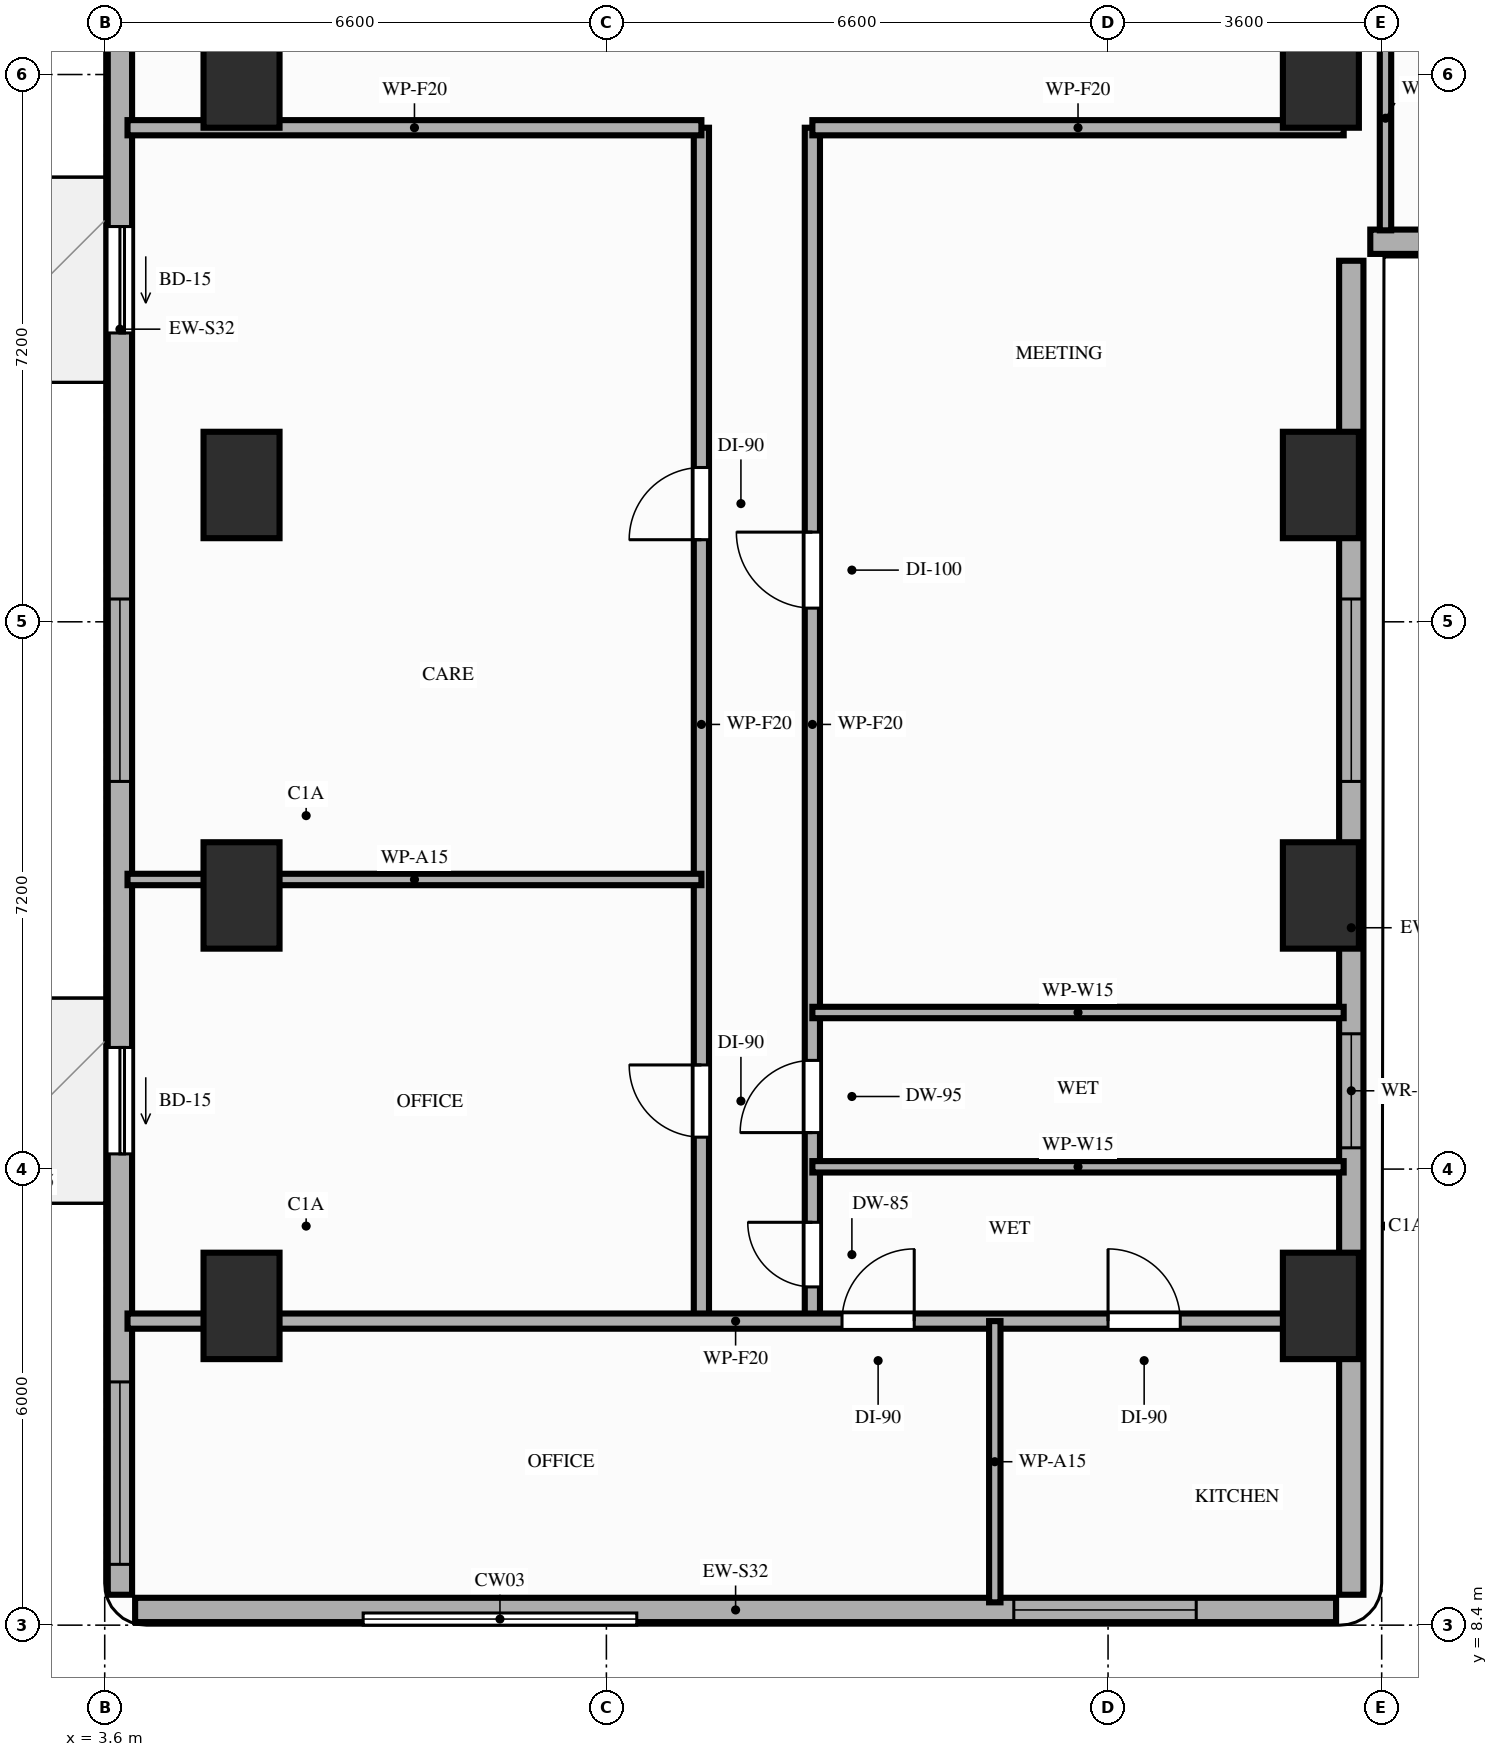
"""IFC4 building model, lengths in metres.
Left out: names, types, materials, properties, quantities, classifications, styles, units other than length and angle.
Written with IfcOpenShell. Run it as: python <this file> out.ifc"""

import sys

from ifc_helpers import new_model, si_unit, direction, frame, frame_2d, origin, origin_2d, place, context, subcontext, project, spatial, rectangle, extrude, element, fill, save


model = new_model("IFC4")
c1 = context("Model", 3, precision=1e-05, world=origin(), true_north=direction((0.0, 1.0)))
c2 = subcontext(c1, "Body", "Model", "MODEL_VIEW")
j1 = project(units=[si_unit("LENGTHUNIT", "METRE"), si_unit("PLANEANGLEUNIT", "RADIAN")], contexts=[c1])
p1 = place(None, origin())
s1 = spatial("IfcSite", under=j1, at=p1, CompositionType="ELEMENT")
p2 = place(p1, origin())
s2 = spatial("IfcBuilding", under=s1, at=p2, CompositionType="ELEMENT")
p3 = place(p2, frame((0.0, 0.0, 66.0)))
s3 = spatial("IfcBuildingStorey", under=s2, at=p3, CompositionType="ELEMENT", Elevation=66.0)
for number, where, z_axis, x_axis in (
    (1, (5.4, 12.6, 0.0), (0.0, 0.0, 1.0), (1.0, 0.0, 0.0)),
    (2, (19.6, 12.6, 0.0), (0.0, 0.0, 1.0), (1.0, 0.0, 0.0)),
    (3, (5.4, 18.0, 0.0), (0.0, 0.0, 1.0), (1.0, 0.0, 0.0)),
    (4, (19.6, 18.0, 0.0), (0.0, 0.0, 1.0), (1.0, 0.0, 0.0)),
    (5, (5.4, 23.4, 0.0), (0.0, 0.0, 1.0), (1.0, 0.0, 0.0)),
    (6, (19.6, 23.4, 0.0), (0.0, 0.0, 1.0), (1.0, 0.0, 0.0)),
    (7, (5.4, 28.8, 0.0), (0.0, 0.0, 1.0), (1.0, 0.0, 0.0)),
    (8, (19.6, 28.8, 0.0), (0.0, 0.0, 1.0), (1.0, 0.0, 0.0)),
):
    element("IfcColumn", number, at=place(p3, frame(where, z_axis=z_axis, x_axis=x_axis)), inside=s3, PredefinedType="COLUMN", context=c2, shape_type="SweptSolid", body=[
        extrude(rectangle(XDim=1.0, YDim=1.4, at=origin_2d()), origin(), (0.0, 0.0, 1.0), 3.2),
    ])
p4 = place(p3, frame((4.0, 8.6, 0.0), z_axis=(0.0, 0.0, 1.0), x_axis=(1.0, 0.0, 0.0)))
e9 = element("IfcWall", 9, at=p4, inside=s3, PredefinedType="STANDARD", context=c2, shape_type="SweptSolid", body=[
    extrude(rectangle(XDim=15.8, YDim=0.32, at=frame_2d((7.9, 0.0))), origin(), (0.0, 0.0, 1.0), 3.02),
])
p5 = place(p4, frame((11.56, 0.0, 0.85)))
e10 = element("IfcOpeningElement", 10, at=p5, cuts=e9, PredefinedType="OPENING", context=c2, shape_type="SweptSolid", body=[
    extrude(rectangle(XDim=2.4, YDim=1.8, at=frame_2d((1.2, 0.9))), frame((0.0, 0.17, 0.0), z_axis=(0.0, -1.0, 0.0), x_axis=(1.0, 0.0, 0.0)), (0.0, 0.0, 1.0), 0.34),
])
p6 = place(p3, frame((3.8, 42.1, 0.0), z_axis=(0.0, 0.0, 1.0), x_axis=(0.0, -1.0, 0.0)))
e11 = element("IfcWall", 11, at=p6, inside=s3, PredefinedType="STANDARD", context=c2, shape_type="SweptSolid", body=[
    extrude(rectangle(XDim=33.3, YDim=0.32, at=frame_2d((16.65, 0.0))), origin(), (0.0, 0.0, 1.0), 2.7),
])
p7 = place(p6, frame((26.1, 0.0, 0.0)))
e12 = element("IfcOpeningElement", 12, at=p7, cuts=e11, PredefinedType="OPENING", context=c2, shape_type="SweptSolid", body=[
    extrude(rectangle(XDim=1.4, YDim=2.1, at=frame_2d((0.7, 1.05))), frame((0.0, 0.17, 0.0), z_axis=(0.0, -1.0, 0.0), x_axis=(1.0, 0.0, 0.0)), (0.0, 0.0, 1.0), 0.34),
])
p8 = place(p6, frame((15.3, 0.0, 0.0)))
e13 = element("IfcOpeningElement", 13, at=p8, cuts=e11, PredefinedType="OPENING", context=c2, shape_type="SweptSolid", body=[
    extrude(rectangle(XDim=1.4, YDim=2.1, at=frame_2d((0.7, 1.05))), frame((0.0, 0.17, 0.0), z_axis=(0.0, -1.0, 0.0), x_axis=(1.0, 0.0, 0.0)), (0.0, 0.0, 1.0), 0.34),
])
p9 = place(p6, frame((30.5, 0.0, 0.85)))
e14 = element("IfcOpeningElement", 14, at=p9, cuts=e11, PredefinedType="OPENING", context=c2, shape_type="SweptSolid", body=[
    extrude(rectangle(XDim=2.4, YDim=1.6, at=frame_2d((1.2, 0.8))), frame((0.0, 0.17, 0.0), z_axis=(0.0, -1.0, 0.0), x_axis=(1.0, 0.0, 0.0)), (0.0, 0.0, 1.0), 0.34),
])
p10 = place(p6, frame((20.2, 0.0, 0.85)))
e15 = element("IfcOpeningElement", 15, at=p10, cuts=e11, PredefinedType="OPENING", context=c2, shape_type="SweptSolid", body=[
    extrude(rectangle(XDim=2.4, YDim=1.6, at=frame_2d((1.2, 0.8))), frame((0.0, 0.17, 0.0), z_axis=(0.0, -1.0, 0.0), x_axis=(1.0, 0.0, 0.0)), (0.0, 0.0, 1.0), 0.34),
])
p11 = place(p6, frame((9.6, 0.0, 0.85)))
e16 = element("IfcOpeningElement", 16, at=p11, cuts=e11, PredefinedType="OPENING", context=c2, shape_type="SweptSolid", body=[
    extrude(rectangle(XDim=2.4, YDim=1.6, at=frame_2d((1.2, 0.8))), frame((0.0, 0.17, 0.0), z_axis=(0.0, -1.0, 0.0), x_axis=(1.0, 0.0, 0.0)), (0.0, 0.0, 1.0), 0.34),
])
p12 = place(p6, frame((3.5, 0.0, 0.85)))
e17 = element("IfcOpeningElement", 17, at=p12, cuts=e11, PredefinedType="OPENING", context=c2, shape_type="SweptSolid", body=[
    extrude(rectangle(XDim=2.4, YDim=1.6, at=frame_2d((1.2, 0.8))), frame((0.0, 0.17, 0.0), z_axis=(0.0, -1.0, 0.0), x_axis=(1.0, 0.0, 0.0)), (0.0, 0.0, 1.0), 0.34),
])
p13 = place(p3, frame((20.0, 8.8, 0.0), z_axis=(0.0, 0.0, 1.0), x_axis=(0.0, 1.0, 0.0)))
e18 = element("IfcWall", 18, at=p13, inside=s3, PredefinedType="STANDARD", context=c2, shape_type="SweptSolid", body=[
    extrude(rectangle(XDim=17.55, YDim=0.32, at=frame_2d((8.775, 0.0))), origin(), (0.0, 0.0, 1.0), 2.41),
])
p14 = place(p13, frame((5.88, 0.0, 0.85)))
e19 = element("IfcOpeningElement", 19, at=p14, cuts=e18, PredefinedType="OPENING", context=c2, shape_type="SweptSolid", body=[
    extrude(rectangle(XDim=1.5, YDim=1.31, at=frame_2d((0.75, 0.655))), frame((0.0, 0.17, 0.0), z_axis=(0.0, -1.0, 0.0), x_axis=(1.0, 0.0, 0.0)), (0.0, 0.0, 1.0), 0.34),
])
p15 = place(p13, frame((10.7, 0.0, 0.85)))
e20 = element("IfcOpeningElement", 20, at=p15, cuts=e18, PredefinedType="OPENING", context=c2, shape_type="SweptSolid", body=[
    extrude(rectangle(XDim=2.4, YDim=1.31, at=frame_2d((1.2, 0.655))), frame((0.0, 0.17, 0.0), z_axis=(0.0, -1.0, 0.0), x_axis=(1.0, 0.0, 0.0)), (0.0, 0.0, 1.0), 0.34),
])
p16 = place(p3, frame((20.25, 26.6, 0.0), z_axis=(0.0, 0.0, 1.0), x_axis=(1.0, 0.0, 0.0)))
e21 = element("IfcWall", 21, at=p16, inside=s3, PredefinedType="STANDARD", context=c2, shape_type="SweptSolid", body=[
    extrude(rectangle(XDim=26.15, YDim=0.32, at=frame_2d((13.075, 0.0))), origin(), (0.0, 0.0, 1.0), 2.7),
])
p17 = place(p16, frame((1.95, 0.0, 0.85)))
e22 = element("IfcOpeningElement", 22, at=p17, cuts=e21, PredefinedType="OPENING", context=c2, shape_type="SweptSolid", body=[
    extrude(rectangle(XDim=2.4, YDim=1.6, at=frame_2d((1.2, 0.8))), frame((0.0, 0.17, 0.0), z_axis=(0.0, -1.0, 0.0), x_axis=(1.0, 0.0, 0.0)), (0.0, 0.0, 1.0), 0.34),
])
p18 = place(p16, frame((7.45, 0.0, 0.85)))
e23 = element("IfcOpeningElement", 23, at=p18, cuts=e21, PredefinedType="OPENING", context=c2, shape_type="SweptSolid", body=[
    extrude(rectangle(XDim=2.4, YDim=1.6, at=frame_2d((1.2, 0.8))), frame((0.0, 0.17, 0.0), z_axis=(0.0, -1.0, 0.0), x_axis=(1.0, 0.0, 0.0)), (0.0, 0.0, 1.0), 0.34),
])
p19 = place(p16, frame((21.95, 0.0, 0.85)))
e24 = element("IfcOpeningElement", 24, at=p19, cuts=e21, PredefinedType="OPENING", context=c2, shape_type="SweptSolid", body=[
    extrude(rectangle(XDim=2.4, YDim=1.6, at=frame_2d((1.2, 0.8))), frame((0.0, 0.17, 0.0), z_axis=(0.0, -1.0, 0.0), x_axis=(1.0, 0.0, 0.0)), (0.0, 0.0, 1.0), 0.34),
])
p20 = place(p3, frame((11.45, 12.4, 0.0), z_axis=(0.0, 0.0, 1.0), x_axis=(0.0, 1.0, 0.0)))
e25 = element("IfcWall", 25, at=p20, inside=s3, PredefinedType="PARTITIONING", context=c2, shape_type="SweptSolid", body=[
    extrude(rectangle(XDim=15.7, YDim=0.2, at=frame_2d((7.85, 0.0))), origin(), (0.0, 0.0, 1.0), 2.41),
])
p21 = place(p20, frame((2.42, 0.0, 0.0)))
e26 = element("IfcOpeningElement", 26, at=p21, cuts=e25, PredefinedType="OPENING", context=c2, shape_type="SweptSolid", body=[
    extrude(rectangle(XDim=0.95, YDim=2.15, at=frame_2d((0.475, 1.075))), frame((0.0, 0.11, 0.0), z_axis=(0.0, -1.0, 0.0), x_axis=(1.0, 0.0, 0.0)), (0.0, 0.0, 1.0), 0.22),
])
p22 = place(p20, frame((10.28, 0.0, 0.0)))
e27 = element("IfcOpeningElement", 27, at=p22, cuts=e25, PredefinedType="OPENING", context=c2, shape_type="SweptSolid", body=[
    extrude(rectangle(XDim=0.95, YDim=2.15, at=frame_2d((0.475, 1.075))), frame((0.0, 0.11, 0.0), z_axis=(0.0, -1.0, 0.0), x_axis=(1.0, 0.0, 0.0)), (0.0, 0.0, 1.0), 0.22),
])
p23 = place(p3, frame((12.91, 12.4, 0.0), z_axis=(0.0, 0.0, 1.0), x_axis=(0.0, 1.0, 0.0)))
e28 = element("IfcWall", 28, at=p23, inside=s3, PredefinedType="PARTITIONING", context=c2, shape_type="SweptSolid", body=[
    extrude(rectangle(XDim=15.7, YDim=0.2, at=frame_2d((7.85, 0.0))), origin(), (0.0, 0.0, 1.0), 2.41),
])
p24 = place(p23, frame((0.45, 0.0, 0.0)))
e29 = element("IfcOpeningElement", 29, at=p24, cuts=e28, PredefinedType="OPENING", context=c2, shape_type="SweptSolid", body=[
    extrude(rectangle(XDim=0.85, YDim=2.1, at=frame_2d((0.425, 1.05))), frame((0.0, 0.11, 0.0), z_axis=(0.0, -1.0, 0.0), x_axis=(1.0, 0.0, 0.0)), (0.0, 0.0, 1.0), 0.22),
])
p25 = place(p23, frame((2.48, 0.0, 0.0)))
e30 = element("IfcOpeningElement", 30, at=p25, cuts=e28, PredefinedType="OPENING", context=c2, shape_type="SweptSolid", body=[
    extrude(rectangle(XDim=0.95, YDim=2.1, at=frame_2d((0.475, 1.05))), frame((0.0, 0.11, 0.0), z_axis=(0.0, -1.0, 0.0), x_axis=(1.0, 0.0, 0.0)), (0.0, 0.0, 1.0), 0.22),
])
p26 = place(p23, frame((9.38, 0.0, 0.0)))
e31 = element("IfcOpeningElement", 31, at=p26, cuts=e28, PredefinedType="OPENING", context=c2, shape_type="SweptSolid", body=[
    extrude(rectangle(XDim=1.0, YDim=2.15, at=frame_2d((0.5, 1.075))), frame((0.0, 0.11, 0.0), z_axis=(0.0, -1.0, 0.0), x_axis=(1.0, 0.0, 0.0)), (0.0, 0.0, 1.0), 0.22),
])
p27 = place(p3, frame((3.9, 12.4, 0.0), z_axis=(0.0, 0.0, 1.0), x_axis=(1.0, 0.0, 0.0)))
e32 = element("IfcWall", 32, at=p27, inside=s3, PredefinedType="PARTITIONING", context=c2, shape_type="SweptSolid", body=[
    extrude(rectangle(XDim=16.0, YDim=0.2, at=frame_2d((8.0, 0.0))), origin(), (0.0, 0.0, 1.0), 2.41),
])
p28 = place(p27, frame((9.4, 0.0, 0.0)))
e33 = element("IfcOpeningElement", 33, at=p28, cuts=e32, PredefinedType="OPENING", context=c2, shape_type="SweptSolid", body=[
    extrude(rectangle(XDim=0.95, YDim=2.15, at=frame_2d((0.475, 1.075))), frame((0.0, 0.11, 0.0), z_axis=(0.0, -1.0, 0.0), x_axis=(1.0, 0.0, 0.0)), (0.0, 0.0, 1.0), 0.22),
])
p29 = place(p27, frame((12.9, 0.0, 0.0)))
e34 = element("IfcOpeningElement", 34, at=p29, cuts=e32, PredefinedType="OPENING", context=c2, shape_type="SweptSolid", body=[
    extrude(rectangle(XDim=0.95, YDim=2.15, at=frame_2d((0.475, 1.075))), frame((0.0, 0.11, 0.0), z_axis=(0.0, -1.0, 0.0), x_axis=(1.0, 0.0, 0.0)), (0.0, 0.0, 1.0), 0.22),
])
p30 = place(p3, frame((3.9, 28.1, 0.0), z_axis=(0.0, 0.0, 1.0), x_axis=(1.0, 0.0, 0.0)))
e35 = element("IfcWall", 35, at=p30, inside=s3, PredefinedType="PARTITIONING", context=c2, shape_type="SweptSolid", body=[
    extrude(rectangle(XDim=7.55, YDim=0.2, at=frame_2d((3.775, 0.0))), origin(), (0.0, 0.0, 1.0), 2.41),
])
p31 = place(p3, frame((12.91, 28.1, 0.0), z_axis=(0.0, 0.0, 1.0), x_axis=(1.0, 0.0, 0.0)))
e36 = element("IfcWall", 36, at=p31, inside=s3, PredefinedType="PARTITIONING", context=c2, shape_type="SweptSolid", body=[
    extrude(rectangle(XDim=6.99, YDim=0.2, at=frame_2d((3.495, 0.0))), origin(), (0.0, 0.0, 1.0), 2.41),
])
p32 = place(p3, frame((20.45, 26.75, 0.0), z_axis=(0.0, 0.0, 1.0), x_axis=(0.0, 1.0, 0.0)))
e37 = element("IfcWall", 37, at=p32, inside=s3, PredefinedType="PARTITIONING", context=c2, shape_type="SweptSolid", body=[
    extrude(rectangle(XDim=2.95, YDim=0.15, at=frame_2d((1.475, 0.0))), origin(), (0.0, 0.0, 1.0), 2.41),
])
p33 = place(p3, frame((3.9, 18.21, 0.0), z_axis=(0.0, 0.0, 1.0), x_axis=(1.0, 0.0, 0.0)))
e38 = element("IfcWall", 38, at=p33, inside=s3, PredefinedType="PARTITIONING", context=c2, shape_type="SweptSolid", body=[
    extrude(rectangle(XDim=7.55, YDim=0.15, at=frame_2d((3.775, 0.0))), origin(), (0.0, 0.0, 1.0), 2.41),
])
p34 = place(p3, frame((15.31, 8.7, 0.0), z_axis=(0.0, 0.0, 1.0), x_axis=(0.0, 1.0, 0.0)))
e39 = element("IfcWall", 39, at=p34, inside=s3, PredefinedType="PARTITIONING", context=c2, shape_type="SweptSolid", body=[
    extrude(rectangle(XDim=3.7, YDim=0.15, at=frame_2d((1.85, 0.0))), origin(), (0.0, 0.0, 1.0), 2.41),
])
for number, where, z_axis, x_axis in (
    (40, (12.91, 14.43, 0.0), (0.0, 0.0, 1.0), (1.0, 0.0, 0.0)),
    (41, (12.91, 16.46, 0.0), (0.0, 0.0, 1.0), (1.0, 0.0, 0.0)),
):
    element("IfcWall", number, at=place(p3, frame(where, z_axis=z_axis, x_axis=x_axis)), inside=s3, PredefinedType="PARTITIONING", context=c2, shape_type="SweptSolid", body=[
        extrude(rectangle(XDim=6.99, YDim=0.15, at=frame_2d((3.495, 0.0))), origin(), (0.0, 0.0, 1.0), 2.41),
    ])
p35 = place(p7, origin())
e42 = element("IfcDoor", 42, at=p35, inside=s3, OperationType="SLIDING_TO_RIGHT", PredefinedType="DOOR", context=c2, shape_type="SweptSolid", body=[
    extrude(rectangle(XDim=1.4, YDim=2.1, at=frame_2d((0.7, 1.05))), frame((0.0, 0.025, 0.0), z_axis=(0.0, -1.0, 0.0), x_axis=(1.0, 0.0, 0.0)), (0.0, 0.0, 1.0), 0.05),
])
fill(e12, e42)
p36 = place(p8, origin())
e43 = element("IfcDoor", 43, at=p36, inside=s3, OperationType="SLIDING_TO_RIGHT", PredefinedType="DOOR", context=c2, shape_type="SweptSolid", body=[
    extrude(rectangle(XDim=1.4, YDim=2.1, at=frame_2d((0.7, 1.05))), frame((0.0, 0.025, 0.0), z_axis=(0.0, -1.0, 0.0), x_axis=(1.0, 0.0, 0.0)), (0.0, 0.0, 1.0), 0.05),
])
fill(e13, e43)
p37 = place(p9, origin())
e44 = element("IfcWindow", 44, at=p37, inside=s3, PartitioningType="SINGLE_PANEL", PredefinedType="WINDOW", context=c2, shape_type="SweptSolid", body=[
    extrude(rectangle(XDim=2.4, YDim=1.6, at=frame_2d((1.2, 0.8))), frame((0.0, 0.03, 0.0), z_axis=(0.0, -1.0, 0.0), x_axis=(1.0, 0.0, 0.0)), (0.0, 0.0, 1.0), 0.06),
])
fill(e14, e44)
p38 = place(p10, origin())
e45 = element("IfcWindow", 45, at=p38, inside=s3, PartitioningType="SINGLE_PANEL", PredefinedType="WINDOW", context=c2, shape_type="SweptSolid", body=[
    extrude(rectangle(XDim=2.4, YDim=1.6, at=frame_2d((1.2, 0.8))), frame((0.0, 0.03, 0.0), z_axis=(0.0, -1.0, 0.0), x_axis=(1.0, 0.0, 0.0)), (0.0, 0.0, 1.0), 0.06),
])
fill(e15, e45)
p39 = place(p14, origin())
e46 = element("IfcWindow", 46, at=p39, inside=s3, PartitioningType="SINGLE_PANEL", PredefinedType="WINDOW", context=c2, shape_type="SweptSolid", body=[
    extrude(rectangle(XDim=1.5, YDim=1.31, at=frame_2d((0.75, 0.655))), frame((0.0, 0.03, 0.0), z_axis=(0.0, -1.0, 0.0), x_axis=(1.0, 0.0, 0.0)), (0.0, 0.0, 1.0), 0.06),
])
fill(e19, e46)
p40 = place(p15, origin())
e47 = element("IfcWindow", 47, at=p40, inside=s3, PartitioningType="SINGLE_PANEL", PredefinedType="WINDOW", context=c2, shape_type="SweptSolid", body=[
    extrude(rectangle(XDim=2.4, YDim=1.31, at=frame_2d((1.2, 0.655))), frame((0.0, 0.03, 0.0), z_axis=(0.0, -1.0, 0.0), x_axis=(1.0, 0.0, 0.0)), (0.0, 0.0, 1.0), 0.06),
])
fill(e20, e47)
p41 = place(p5, origin())
e48 = element("IfcWindow", 48, at=p41, inside=s3, PartitioningType="SINGLE_PANEL", PredefinedType="WINDOW", context=c2, shape_type="SweptSolid", body=[
    extrude(rectangle(XDim=2.4, YDim=1.8, at=frame_2d((1.2, 0.9))), frame((0.0, 0.03, 0.0), z_axis=(0.0, -1.0, 0.0), x_axis=(1.0, 0.0, 0.0)), (0.0, 0.0, 1.0), 0.06),
])
fill(e10, e48)
p42 = place(p21, origin())
e49 = element("IfcDoor", 49, at=p42, inside=s3, OperationType="SINGLE_SWING_RIGHT", PredefinedType="DOOR", context=c2, shape_type="SweptSolid", body=[
    extrude(rectangle(XDim=0.95, YDim=2.15, at=frame_2d((0.475, 1.075))), frame((0.0, 0.025, 0.0), z_axis=(0.0, -1.0, 0.0), x_axis=(1.0, 0.0, 0.0)), (0.0, 0.0, 1.0), 0.05),
])
fill(e26, e49)
p43 = place(p22, origin())
e50 = element("IfcDoor", 50, at=p43, inside=s3, OperationType="SINGLE_SWING_LEFT", PredefinedType="DOOR", context=c2, shape_type="SweptSolid", body=[
    extrude(rectangle(XDim=0.95, YDim=2.15, at=frame_2d((0.475, 1.075))), frame((0.0, 0.025, 0.0), z_axis=(0.0, -1.0, 0.0), x_axis=(1.0, 0.0, 0.0)), (0.0, 0.0, 1.0), 0.05),
])
fill(e27, e50)
p44 = place(p28, origin())
e51 = element("IfcDoor", 51, at=p44, inside=s3, OperationType="SINGLE_SWING_RIGHT", PredefinedType="DOOR", context=c2, shape_type="SweptSolid", body=[
    extrude(rectangle(XDim=0.95, YDim=2.15, at=frame_2d((0.475, 1.075))), frame((0.0, 0.025, 0.0), z_axis=(0.0, -1.0, 0.0), x_axis=(1.0, 0.0, 0.0)), (0.0, 0.0, 1.0), 0.05),
])
fill(e33, e51)
p45 = place(p29, origin())
e52 = element("IfcDoor", 52, at=p45, inside=s3, OperationType="SINGLE_SWING_LEFT", PredefinedType="DOOR", context=c2, shape_type="SweptSolid", body=[
    extrude(rectangle(XDim=0.95, YDim=2.15, at=frame_2d((0.475, 1.075))), frame((0.0, 0.025, 0.0), z_axis=(0.0, -1.0, 0.0), x_axis=(1.0, 0.0, 0.0)), (0.0, 0.0, 1.0), 0.05),
])
fill(e34, e52)
p46 = place(p24, origin())
e53 = element("IfcDoor", 53, at=p46, inside=s3, OperationType="SINGLE_SWING_RIGHT", PredefinedType="DOOR", context=c2, shape_type="SweptSolid", body=[
    extrude(rectangle(XDim=0.85, YDim=2.1, at=frame_2d((0.425, 1.05))), frame((0.0, 0.025, 0.0), z_axis=(0.0, -1.0, 0.0), x_axis=(1.0, 0.0, 0.0)), (0.0, 0.0, 1.0), 0.05),
])
fill(e29, e53)
p47 = place(p25, origin())
e54 = element("IfcDoor", 54, at=p47, inside=s3, OperationType="SINGLE_SWING_LEFT", PredefinedType="DOOR", context=c2, shape_type="SweptSolid", body=[
    extrude(rectangle(XDim=0.95, YDim=2.1, at=frame_2d((0.475, 1.05))), frame((0.0, 0.025, 0.0), z_axis=(0.0, -1.0, 0.0), x_axis=(1.0, 0.0, 0.0)), (0.0, 0.0, 1.0), 0.05),
])
fill(e30, e54)
p48 = place(p26, origin())
e55 = element("IfcDoor", 55, at=p48, inside=s3, OperationType="SINGLE_SWING_RIGHT", PredefinedType="DOOR", context=c2, shape_type="SweptSolid", body=[
    extrude(rectangle(XDim=1.0, YDim=2.15, at=frame_2d((0.5, 1.075))), frame((0.0, 0.025, 0.0), z_axis=(0.0, -1.0, 0.0), x_axis=(1.0, 0.0, 0.0)), (0.0, 0.0, 1.0), 0.05),
])
fill(e31, e55)
save(model, sys.argv[1])
